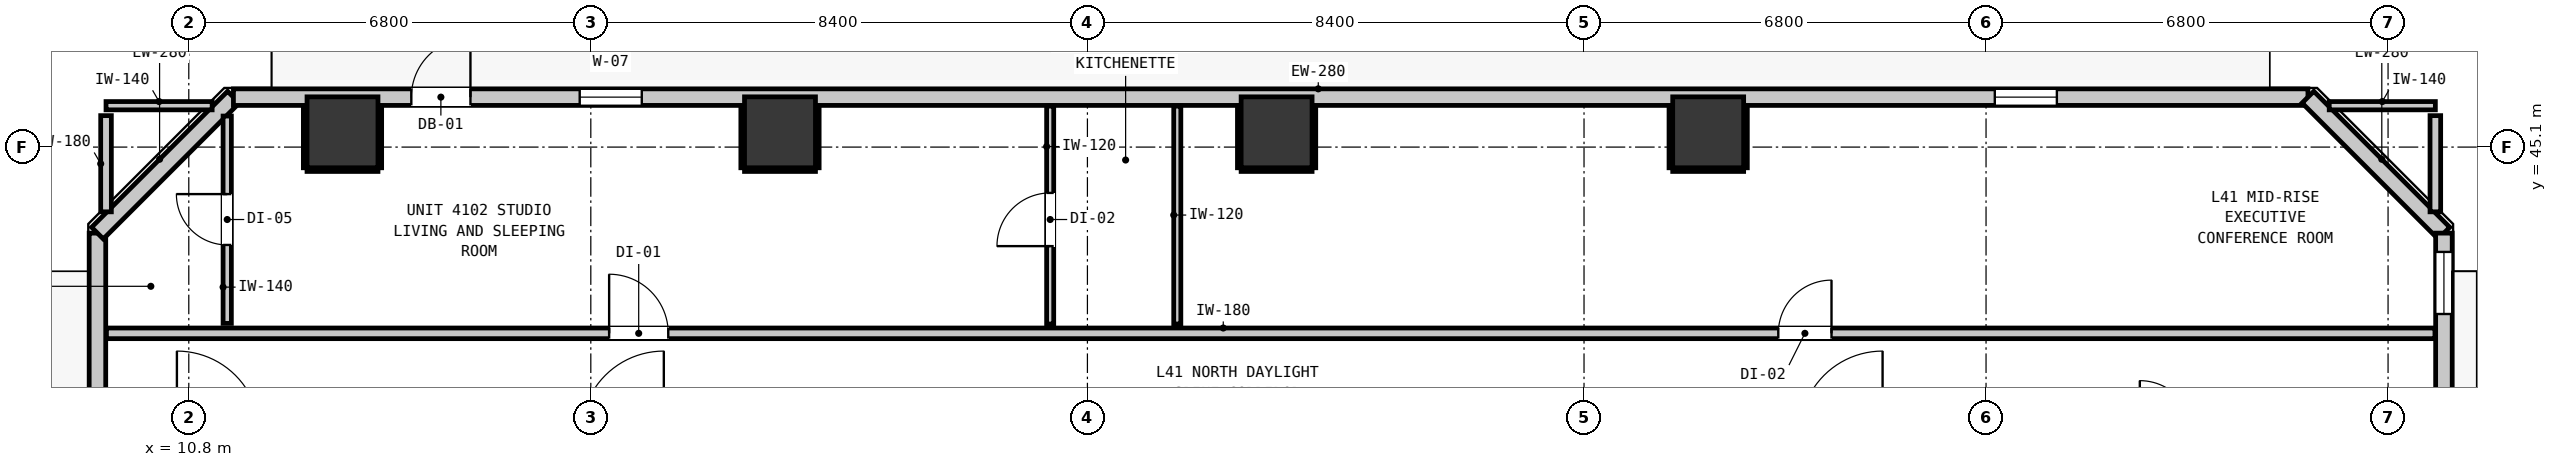
"""IFC4 building model, lengths in metres.
Left out: names, types, materials, properties, quantities, classifications, styles, units other than length and angle.
Written with IfcOpenShell. Run it as: python <this file> out.ifc"""

import sys

from ifc_helpers import new_model, si_unit, direction, frame, frame_2d, origin, origin_2d, place, context, subcontext, project, spatial, rectangle, extrude, element, fill, save


model = new_model("IFC4")
c1 = context("Model", 3, precision=1e-05, world=origin(), true_north=direction((0.0, 1.0)))
c2 = subcontext(c1, "Body", "Model", "MODEL_VIEW")
j1 = project(units=[si_unit("LENGTHUNIT", "METRE"), si_unit("PLANEANGLEUNIT", "RADIAN")], contexts=[c1])
p1 = place(None, origin())
s1 = spatial("IfcSite", under=j1, at=p1, CompositionType="ELEMENT")
p2 = place(p1, origin())
s2 = spatial("IfcBuilding", under=s1, at=p2, CompositionType="ELEMENT")
p3 = place(p2, frame((0.0, 0.0, 142.6)))
s3 = spatial("IfcBuildingStorey", under=s2, at=p3, CompositionType="ELEMENT", Elevation=142.6)
for number, where, z_axis, x_axis in (
    (1, (13.4, 45.35, 0.0), (0.0, 0.0, 1.0), (1.0, 0.0, 0.0)),
    (2, (20.8, 45.35, 0.0), (0.0, 0.0, 1.0), (1.0, 0.0, 0.0)),
    (3, (29.2, 45.35, 0.0), (0.0, 0.0, 1.0), (1.0, 0.0, 0.0)),
    (4, (36.5, 45.35, 0.0), (0.0, 0.0, 1.0), (1.0, 0.0, 0.0)),
):
    element("IfcColumn", number, at=place(p3, frame(where, z_axis=z_axis, x_axis=x_axis)), inside=s3, PredefinedType="COLUMN", context=c2, shape_type="SweptSolid", body=[
        extrude(rectangle(XDim=1.2, YDim=1.2, at=origin_2d()), origin(), (0.0, 0.0, 1.0), 2.9),
    ])
p4 = place(p3, frame((9.255, 11.355, 0.0), z_axis=(0.0, 0.0, 1.0), x_axis=(0.0, 1.0, 0.0)))
e5 = element("IfcWall", 5, at=p4, inside=s3, PredefinedType="STANDARD", context=c2, shape_type="SweptSolid", body=[
    extrude(rectangle(XDim=32.29, YDim=0.28, at=frame_2d((16.145, 0.0))), origin(), (0.0, 0.0, 1.0), 2.9),
])
p5 = place(p4, frame((5.818, 0.0, 0.0)))
e6 = element("IfcOpeningElement", 6, at=p5, cuts=e5, PredefinedType="OPENING", context=c2, shape_type="SweptSolid", body=[
    extrude(rectangle(XDim=1.0, YDim=2.15, at=frame_2d((0.5, 1.075))), frame((0.0, 0.15, 0.0), z_axis=(0.0, -1.0, 0.0), x_axis=(1.0, 0.0, 0.0)), (0.0, 0.0, 1.0), 0.3),
])
p6 = place(p4, frame((0.544, 0.0, 0.85)))
e7 = element("IfcOpeningElement", 7, at=p6, cuts=e5, PredefinedType="OPENING", context=c2, shape_type="SweptSolid", body=[
    extrude(rectangle(XDim=1.05, YDim=1.65, at=frame_2d((0.525, 0.825))), frame((0.0, 0.15, 0.0), z_axis=(0.0, -1.0, 0.0), x_axis=(1.0, 0.0, 0.0)), (0.0, 0.0, 1.0), 0.3),
])
p7 = place(p3, frame((9.255, 43.645, 0.0), z_axis=(0.0, 0.0, 1.0), x_axis=(0.707106781187, 0.707106781187, 0.0)))
e8 = element("IfcWall", 8, at=p7, inside=s3, PredefinedType="STANDARD", context=c2, shape_type="SweptSolid", body=[
    extrude(rectangle(XDim=3.253, YDim=0.28, at=frame_2d((1.626, 0.0))), origin(), (0.0, 0.0, 1.0), 2.9),
])
p8 = place(p3, frame((11.555, 45.945, 0.0), z_axis=(0.0, 0.0, 1.0), x_axis=(1.0, 0.0, 0.0)))
e9 = element("IfcWall", 9, at=p8, inside=s3, PredefinedType="STANDARD", context=c2, shape_type="SweptSolid", body=[
    extrude(rectangle(XDim=35.09, YDim=0.28, at=frame_2d((17.545, 0.0))), origin(), (0.0, 0.0, 1.0), 2.9),
])
p9 = place(p8, frame((3.009, 0.0, 0.0)))
e10 = element("IfcOpeningElement", 10, at=p9, cuts=e9, PredefinedType="OPENING", context=c2, shape_type="SweptSolid", body=[
    extrude(rectangle(XDim=1.0, YDim=2.15, at=frame_2d((0.5, 1.075))), frame((0.0, 0.15, 0.0), z_axis=(0.0, -1.0, 0.0), x_axis=(1.0, 0.0, 0.0)), (0.0, 0.0, 1.0), 0.3),
])
p10 = place(p8, frame((5.857, 0.0, 0.85)))
e11 = element("IfcOpeningElement", 11, at=p10, cuts=e9, PredefinedType="OPENING", context=c2, shape_type="SweptSolid", body=[
    extrude(rectangle(XDim=1.05, YDim=1.65, at=frame_2d((0.525, 0.825))), frame((0.0, 0.15, 0.0), z_axis=(0.0, -1.0, 0.0), x_axis=(1.0, 0.0, 0.0)), (0.0, 0.0, 1.0), 0.3),
])
p11 = place(p8, frame((29.793, 0.0, 0.85)))
e12 = element("IfcOpeningElement", 12, at=p11, cuts=e9, PredefinedType="OPENING", context=c2, shape_type="SweptSolid", body=[
    extrude(rectangle(XDim=1.05, YDim=1.65, at=frame_2d((0.525, 0.825))), frame((0.0, 0.15, 0.0), z_axis=(0.0, -1.0, 0.0), x_axis=(1.0, 0.0, 0.0)), (0.0, 0.0, 1.0), 0.3),
])
p12 = place(p3, frame((46.645, 45.945, 0.0), z_axis=(0.0, 0.0, 1.0), x_axis=(0.707106781187, -0.707106781187, 0.0)))
e13 = element("IfcWall", 13, at=p12, inside=s3, PredefinedType="STANDARD", context=c2, shape_type="SweptSolid", body=[
    extrude(rectangle(XDim=3.253, YDim=0.28, at=frame_2d((1.626, 0.0))), origin(), (0.0, 0.0, 1.0), 2.9),
])
p13 = place(p3, frame((48.945, 43.645, 0.0), z_axis=(0.0, 0.0, 1.0), x_axis=(0.0, -1.0, 0.0)))
e14 = element("IfcWall", 14, at=p13, inside=s3, PredefinedType="STANDARD", context=c2, shape_type="SweptSolid", body=[
    extrude(rectangle(XDim=32.29, YDim=0.28, at=frame_2d((16.145, 0.0))), origin(), (0.0, 0.0, 1.0), 2.9),
])
p14 = place(p13, frame((5.467, 0.0, 0.0)))
e15 = element("IfcOpeningElement", 15, at=p14, cuts=e14, PredefinedType="OPENING", context=c2, shape_type="SweptSolid", body=[
    extrude(rectangle(XDim=1.0, YDim=2.15, at=frame_2d((0.5, 1.075))), frame((0.0, 0.15, 0.0), z_axis=(0.0, -1.0, 0.0), x_axis=(1.0, 0.0, 0.0)), (0.0, 0.0, 1.0), 0.3),
])
p15 = place(p13, frame((29.073, 0.0, 0.85)))
e16 = element("IfcOpeningElement", 16, at=p15, cuts=e14, PredefinedType="OPENING", context=c2, shape_type="SweptSolid", body=[
    extrude(rectangle(XDim=1.05, YDim=1.65, at=frame_2d((0.525, 0.825))), frame((0.0, 0.15, 0.0), z_axis=(0.0, -1.0, 0.0), x_axis=(1.0, 0.0, 0.0)), (0.0, 0.0, 1.0), 0.3),
])
p16 = place(p13, frame((0.318, 0.0, 0.85)))
e17 = element("IfcOpeningElement", 17, at=p16, cuts=e14, PredefinedType="OPENING", context=c2, shape_type="SweptSolid", body=[
    extrude(rectangle(XDim=1.05, YDim=1.65, at=frame_2d((0.525, 0.825))), frame((0.0, 0.15, 0.0), z_axis=(0.0, -1.0, 0.0), x_axis=(1.0, 0.0, 0.0)), (0.0, 0.0, 1.0), 0.3),
])
p17 = place(p13, frame((16.201, 0.0, 0.85)))
e18 = element("IfcOpeningElement", 18, at=p17, cuts=e14, PredefinedType="OPENING", context=c2, shape_type="SweptSolid", body=[
    extrude(rectangle(XDim=1.05, YDim=1.65, at=frame_2d((0.525, 0.825))), frame((0.0, 0.15, 0.0), z_axis=(0.0, -1.0, 0.0), x_axis=(1.0, 0.0, 0.0)), (0.0, 0.0, 1.0), 0.3),
])
p18 = place(p13, frame((10.57, 0.0, 0.85)))
e19 = element("IfcOpeningElement", 19, at=p18, cuts=e14, PredefinedType="OPENING", context=c2, shape_type="SweptSolid", body=[
    extrude(rectangle(XDim=1.05, YDim=1.65, at=frame_2d((0.525, 0.825))), frame((0.0, 0.15, 0.0), z_axis=(0.0, -1.0, 0.0), x_axis=(1.0, 0.0, 0.0)), (0.0, 0.0, 1.0), 0.3),
])
p19 = place(p3, frame((9.407, 41.95, 0.0), z_axis=(0.0, 0.0, 1.0), x_axis=(1.0, 0.0, 0.0)))
e20 = element("IfcWall", 20, at=p19, inside=s3, PredefinedType="PARTITIONING", context=c2, shape_type="SweptSolid", body=[
    extrude(rectangle(XDim=39.386, YDim=0.18, at=frame_2d((19.693, 0.0))), origin(), (0.0, 0.0, 1.0), 2.9),
])
p20 = place(p19, frame((8.503, 0.0, 0.0)))
e21 = element("IfcOpeningElement", 21, at=p20, cuts=e20, PredefinedType="OPENING", context=c2, shape_type="SweptSolid", body=[
    extrude(rectangle(XDim=1.0, YDim=2.15, at=frame_2d((0.5, 1.075))), frame((0.0, 0.1, 0.0), z_axis=(0.0, -1.0, 0.0), x_axis=(1.0, 0.0, 0.0)), (0.0, 0.0, 1.0), 0.2),
])
p21 = place(p19, frame((28.279, 0.0, 0.0)))
e22 = element("IfcOpeningElement", 22, at=p21, cuts=e20, PredefinedType="OPENING", context=c2, shape_type="SweptSolid", body=[
    extrude(rectangle(XDim=0.9, YDim=2.1, at=frame_2d((0.45, 1.05))), frame((0.0, 0.1, 0.0), z_axis=(0.0, -1.0, 0.0), x_axis=(1.0, 0.0, 0.0)), (0.0, 0.0, 1.0), 0.2),
])
for number, where, z_axis, x_axis in (
    (23, (9.4, 45.8, 0.0), (0.0, 0.0, 1.0), (1.0, 0.0, 0.0)),
    (24, (47.005, 45.8, 0.0), (0.0, 0.0, 1.0), (1.0, 0.0, 0.0)),
):
    element("IfcWall", number, at=place(p3, frame(where, z_axis=z_axis, x_axis=x_axis)), inside=s3, PredefinedType="PARTITIONING", context=c2, shape_type="SweptSolid", body=[
        extrude(rectangle(XDim=1.795, YDim=0.14, at=frame_2d((0.897, 0.0))), origin(), (0.0, 0.0, 1.0), 2.9),
    ])
for number, where, z_axis, x_axis in (
    (25, (9.4, 44.005, 0.0), (0.0, 0.0, 1.0), (0.0, 1.0, 0.0)),
    (26, (48.8, 44.005, 0.0), (0.0, 0.0, 1.0), (0.0, 1.0, 0.0)),
):
    element("IfcWall", number, at=place(p3, frame(where, z_axis=z_axis, x_axis=x_axis)), inside=s3, PredefinedType="PARTITIONING", context=c2, shape_type="SweptSolid", body=[
        extrude(rectangle(XDim=1.627, YDim=0.18, at=frame_2d((0.813, 0.0))), origin(), (0.0, 0.0, 1.0), 2.9),
    ])
p22 = place(p3, frame((11.45, 42.118, 0.0), z_axis=(0.0, 0.0, 1.0), x_axis=(0.0, 1.0, 0.0)))
e27 = element("IfcWall", 27, at=p22, inside=s3, PredefinedType="PARTITIONING", context=c2, shape_type="SweptSolid", body=[
    extrude(rectangle(XDim=3.507, YDim=0.14, at=frame_2d((1.753, 0.0))), origin(), (0.0, 0.0, 1.0), 2.9),
])
p23 = place(p22, frame((1.327, 0.0, 0.0)))
e28 = element("IfcOpeningElement", 28, at=p23, cuts=e27, PredefinedType="OPENING", context=c2, shape_type="SweptSolid", body=[
    extrude(rectangle(XDim=0.86, YDim=2.02, at=frame_2d((0.43, 1.01))), frame((0.0, 0.08, 0.0), z_axis=(0.0, -1.0, 0.0), x_axis=(1.0, 0.0, 0.0)), (0.0, 0.0, 1.0), 0.16),
])
p24 = place(p3, frame((25.37, 42.108, 0.0), z_axis=(0.0, 0.0, 1.0), x_axis=(0.0, 1.0, 0.0)))
e29 = element("IfcWall", 29, at=p24, inside=s3, PredefinedType="PARTITIONING", context=c2, shape_type="SweptSolid", body=[
    extrude(rectangle(XDim=3.685, YDim=0.12, at=frame_2d((1.843, 0.0))), origin(), (0.0, 0.0, 1.0), 2.9),
])
p25 = place(p24, frame((1.317, 0.0, 0.0)))
e30 = element("IfcOpeningElement", 30, at=p25, cuts=e29, PredefinedType="OPENING", context=c2, shape_type="SweptSolid", body=[
    extrude(rectangle(XDim=0.9, YDim=2.1, at=frame_2d((0.45, 1.05))), frame((0.0, 0.07, 0.0), z_axis=(0.0, -1.0, 0.0), x_axis=(1.0, 0.0, 0.0)), (0.0, 0.0, 1.0), 0.14),
])
p26 = place(p3, frame((27.52, 42.108, 0.0), z_axis=(0.0, 0.0, 1.0), x_axis=(0.0, 1.0, 0.0)))
e31 = element("IfcWall", 31, at=p26, inside=s3, PredefinedType="PARTITIONING", context=c2, shape_type="SweptSolid", body=[
    extrude(rectangle(XDim=3.685, YDim=0.12, at=frame_2d((1.843, 0.0))), origin(), (0.0, 0.0, 1.0), 2.9),
])
p27 = place(p3, frame((12.8, 44.718, 0.0), z_axis=(0.0, 0.0, 1.0), x_axis=(1.0, 0.0, 0.0)))
e32 = element("IfcWall", 32, at=p27, inside=s3, PredefinedType="PARTITIONING", context=c2, shape_type="SweptSolid", body=[
    extrude(rectangle(XDim=1.2, YDim=0.06, at=frame_2d((0.6, 0.0))), origin(), (0.0, 0.0, 1.0), 1.45),
])
for number, where, z_axis, x_axis in (
    (33, (12.768, 44.75, 0.0), (0.0, 0.0, 1.0), (0.0, 1.0, 0.0)),
    (34, (14.032, 44.75, 0.0), (0.0, 0.0, 1.0), (0.0, 1.0, 0.0)),
):
    element("IfcWall", number, at=place(p3, frame(where, z_axis=z_axis, x_axis=x_axis)), inside=s3, PredefinedType="PARTITIONING", context=c2, shape_type="SweptSolid", body=[
        extrude(rectangle(XDim=1.04, YDim=0.06, at=frame_2d((0.52, 0.0))), origin(), (0.0, 0.0, 1.0), 0.905),
    ])
p28 = place(p3, frame((20.2, 44.718, 0.0), z_axis=(0.0, 0.0, 1.0), x_axis=(1.0, 0.0, 0.0)))
e35 = element("IfcWall", 35, at=p28, inside=s3, PredefinedType="PARTITIONING", context=c2, shape_type="SweptSolid", body=[
    extrude(rectangle(XDim=1.2, YDim=0.06, at=frame_2d((0.6, 0.0))), origin(), (0.0, 0.0, 1.0), 1.45),
])
for number, where, z_axis, x_axis in (
    (36, (20.168, 44.75, 0.0), (0.0, 0.0, 1.0), (0.0, 1.0, 0.0)),
    (37, (21.432, 44.75, 0.0), (0.0, 0.0, 1.0), (0.0, 1.0, 0.0)),
):
    element("IfcWall", number, at=place(p3, frame(where, z_axis=z_axis, x_axis=x_axis)), inside=s3, PredefinedType="PARTITIONING", context=c2, shape_type="SweptSolid", body=[
        extrude(rectangle(XDim=1.04, YDim=0.06, at=frame_2d((0.52, 0.0))), origin(), (0.0, 0.0, 1.0), 0.905),
    ])
p29 = place(p3, frame((28.6, 44.718, 0.0), z_axis=(0.0, 0.0, 1.0), x_axis=(1.0, 0.0, 0.0)))
e38 = element("IfcWall", 38, at=p29, inside=s3, PredefinedType="PARTITIONING", context=c2, shape_type="SweptSolid", body=[
    extrude(rectangle(XDim=1.2, YDim=0.06, at=frame_2d((0.6, 0.0))), origin(), (0.0, 0.0, 1.0), 1.45),
])
for number, where, z_axis, x_axis in (
    (39, (28.568, 44.75, 0.0), (0.0, 0.0, 1.0), (0.0, 1.0, 0.0)),
    (40, (29.832, 44.75, 0.0), (0.0, 0.0, 1.0), (0.0, 1.0, 0.0)),
):
    element("IfcWall", number, at=place(p3, frame(where, z_axis=z_axis, x_axis=x_axis)), inside=s3, PredefinedType="PARTITIONING", context=c2, shape_type="SweptSolid", body=[
        extrude(rectangle(XDim=1.04, YDim=0.06, at=frame_2d((0.52, 0.0))), origin(), (0.0, 0.0, 1.0), 0.905),
    ])
p30 = place(p3, frame((35.9, 44.718, 0.0), z_axis=(0.0, 0.0, 1.0), x_axis=(1.0, 0.0, 0.0)))
e41 = element("IfcWall", 41, at=p30, inside=s3, PredefinedType="PARTITIONING", context=c2, shape_type="SweptSolid", body=[
    extrude(rectangle(XDim=1.2, YDim=0.06, at=frame_2d((0.6, 0.0))), origin(), (0.0, 0.0, 1.0), 1.45),
])
for number, where, z_axis, x_axis in (
    (42, (35.868, 44.75, 0.0), (0.0, 0.0, 1.0), (0.0, 1.0, 0.0)),
    (43, (37.132, 44.75, 0.0), (0.0, 0.0, 1.0), (0.0, 1.0, 0.0)),
):
    element("IfcWall", number, at=place(p3, frame(where, z_axis=z_axis, x_axis=x_axis)), inside=s3, PredefinedType="PARTITIONING", context=c2, shape_type="SweptSolid", body=[
        extrude(rectangle(XDim=1.04, YDim=0.06, at=frame_2d((0.52, 0.0))), origin(), (0.0, 0.0, 1.0), 0.905),
    ])
p31 = place(p9, origin())
e44 = element("IfcDoor", 44, at=p31, inside=s3, OperationType="SINGLE_SWING_RIGHT", PredefinedType="DOOR", context=c2, shape_type="SweptSolid", body=[
    extrude(rectangle(XDim=1.0, YDim=2.15, at=frame_2d((0.5, 1.075))), frame((0.0, 0.025, 0.0), z_axis=(0.0, -1.0, 0.0), x_axis=(1.0, 0.0, 0.0)), (0.0, 0.0, 1.0), 0.05),
])
fill(e10, e44)
p32 = place(p10, origin())
e45 = element("IfcWindow", 45, at=p32, inside=s3, PartitioningType="SINGLE_PANEL", PredefinedType="WINDOW", context=c2, shape_type="SweptSolid", body=[
    extrude(rectangle(XDim=1.05, YDim=1.65, at=frame_2d((0.525, 0.825))), frame((0.0, 0.03, 0.0), z_axis=(0.0, -1.0, 0.0), x_axis=(1.0, 0.0, 0.0)), (0.0, 0.0, 1.0), 0.06),
])
fill(e11, e45)
p33 = place(p11, origin())
e46 = element("IfcWindow", 46, at=p33, inside=s3, PartitioningType="SINGLE_PANEL", PredefinedType="WINDOW", context=c2, shape_type="SweptSolid", body=[
    extrude(rectangle(XDim=1.05, YDim=1.65, at=frame_2d((0.525, 0.825))), frame((0.0, 0.03, 0.0), z_axis=(0.0, -1.0, 0.0), x_axis=(1.0, 0.0, 0.0)), (0.0, 0.0, 1.0), 0.06),
])
fill(e12, e46)
p34 = place(p16, origin())
e47 = element("IfcWindow", 47, at=p34, inside=s3, PartitioningType="SINGLE_PANEL", PredefinedType="WINDOW", context=c2, shape_type="SweptSolid", body=[
    extrude(rectangle(XDim=1.05, YDim=1.65, at=frame_2d((0.525, 0.825))), frame((0.0, 0.03, 0.0), z_axis=(0.0, -1.0, 0.0), x_axis=(1.0, 0.0, 0.0)), (0.0, 0.0, 1.0), 0.06),
])
fill(e17, e47)
p35 = place(p20, origin())
e48 = element("IfcDoor", 48, at=p35, inside=s3, OperationType="SINGLE_SWING_LEFT", PredefinedType="DOOR", context=c2, shape_type="SweptSolid", body=[
    extrude(rectangle(XDim=1.0, YDim=2.15, at=frame_2d((0.5, 1.075))), frame((0.0, 0.025, 0.0), z_axis=(0.0, -1.0, 0.0), x_axis=(1.0, 0.0, 0.0)), (0.0, 0.0, 1.0), 0.05),
])
fill(e21, e48)
p36 = place(p23, origin())
e49 = element("IfcDoor", 49, at=p36, inside=s3, OperationType="SINGLE_SWING_RIGHT", PredefinedType="DOOR", context=c2, shape_type="SweptSolid", body=[
    extrude(rectangle(XDim=0.86, YDim=2.02, at=frame_2d((0.43, 1.01))), frame((0.0, 0.025, 0.0), z_axis=(0.0, -1.0, 0.0), x_axis=(1.0, 0.0, 0.0)), (0.0, 0.0, 1.0), 0.05),
])
fill(e28, e49)
p37 = place(p25, origin())
e50 = element("IfcDoor", 50, at=p37, inside=s3, OperationType="SINGLE_SWING_LEFT", PredefinedType="DOOR", context=c2, shape_type="SweptSolid", body=[
    extrude(rectangle(XDim=0.9, YDim=2.1, at=frame_2d((0.45, 1.05))), frame((0.0, 0.025, 0.0), z_axis=(0.0, -1.0, 0.0), x_axis=(1.0, 0.0, 0.0)), (0.0, 0.0, 1.0), 0.05),
])
fill(e30, e50)
p38 = place(p21, origin())
e51 = element("IfcDoor", 51, at=p38, inside=s3, OperationType="SINGLE_SWING_RIGHT", PredefinedType="DOOR", context=c2, shape_type="SweptSolid", body=[
    extrude(rectangle(XDim=0.9, YDim=2.1, at=frame_2d((0.45, 1.05))), frame((0.0, 0.025, 0.0), z_axis=(0.0, -1.0, 0.0), x_axis=(1.0, 0.0, 0.0)), (0.0, 0.0, 1.0), 0.05),
])
fill(e22, e51)
save(model, sys.argv[1])
